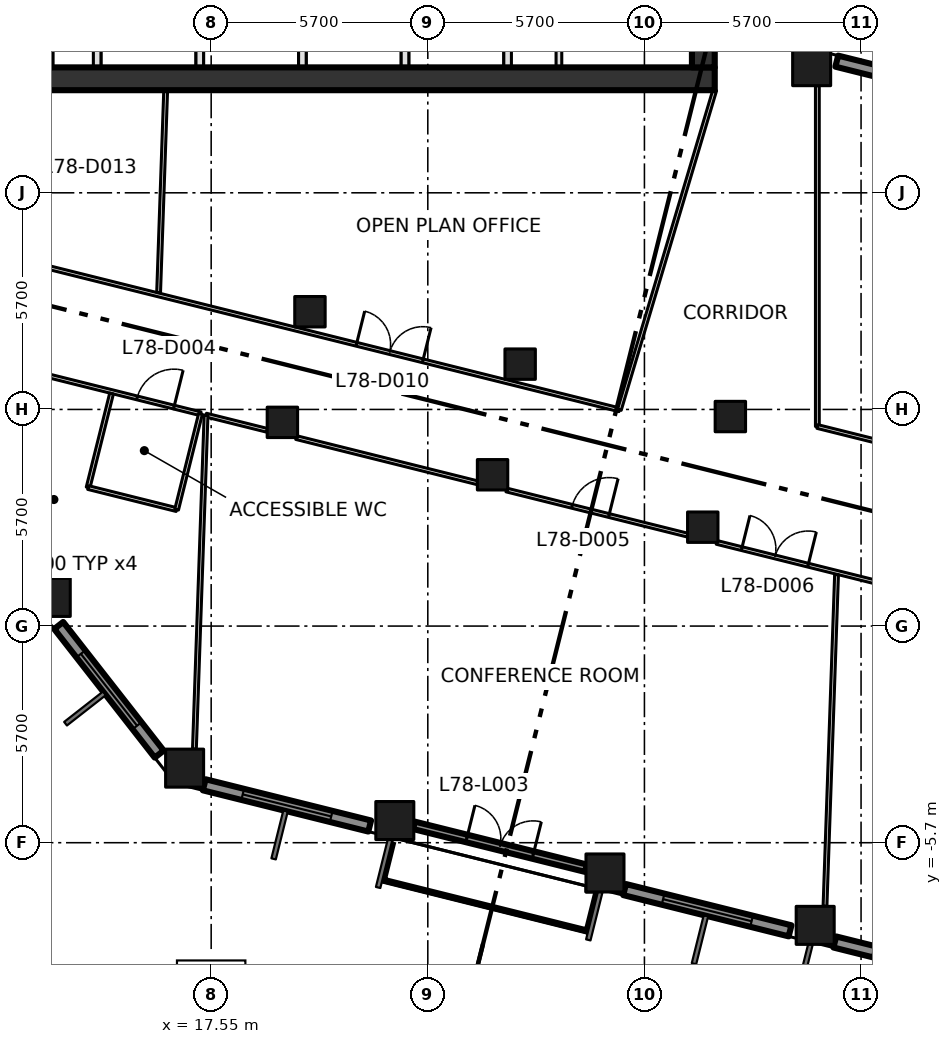
"""IFC4 building model, lengths in metres.
Left out: names, types, materials, properties, quantities, classifications, styles, units other than length and angle.
Written with IfcOpenShell. Run it as: python <this file> out.ifc"""

import sys

from ifc_helpers import new_model, si_unit, direction, frame, frame_2d, origin, origin_2d, place, context, subcontext, project, spatial, rectangle, extrude, element, fill, save


model = new_model("IFC4")
c1 = context("Model", 3, precision=1e-05, world=origin(), true_north=direction((0.0, 1.0)))
c2 = subcontext(c1, "Body", "Model", "MODEL_VIEW")
j1 = project(units=[si_unit("LENGTHUNIT", "METRE"), si_unit("PLANEANGLEUNIT", "RADIAN")], contexts=[c1])
p1 = place(None, origin())
s1 = spatial("IfcSite", under=j1, at=p1, CompositionType="ELEMENT")
p2 = place(p1, origin())
s2 = spatial("IfcBuilding", under=s1, at=p2, CompositionType="ELEMENT")
p3 = place(p2, frame((0.0, 0.0, 340.2)))
s3 = spatial("IfcBuildingStorey", under=s2, at=p3, CompositionType="ELEMENT", Elevation=340.2)
for number, where, z_axis, x_axis in (
    (1, (33.35, 14.719, 0.0), (0.0, 0.0, 1.0), (1.0, 0.0, 0.0)),
    (2, (16.851, -3.738, 0.0), (0.0, 0.0, 1.0), (1.0, 0.0, 0.0)),
    (3, (13.342, 0.754, 0.0), (0.0, 0.0, 1.0), (1.0, 0.0, 0.0)),
    (4, (22.382, -5.117, 0.0), (0.0, 0.0, 1.0), (1.0, 0.0, 0.0)),
    (5, (27.912, -6.496, 0.0), (0.0, 0.0, 1.0), (1.0, 0.0, 0.0)),
    (6, (33.443, -7.875, 0.0), (0.0, 0.0, 1.0), (1.0, 0.0, 0.0)),
):
    element("IfcColumn", number, at=place(p3, frame(where, z_axis=z_axis, x_axis=x_axis)), inside=s3, PredefinedType="COLUMN", context=c2, shape_type="SweptSolid", body=[
        extrude(rectangle(XDim=1.0, YDim=1.0, at=origin_2d()), origin(), (0.0, 0.0, 1.0), 4.2),
    ])
for number, where, z_axis, x_axis in (
    (7, (19.424, 5.36, 0.0), (0.0, 0.0, 1.0), (1.0, 0.0, 0.0)),
    (8, (24.954, 3.981, 0.0), (0.0, 0.0, 1.0), (1.0, 0.0, 0.0)),
    (9, (30.485, 2.602, 0.0), (0.0, 0.0, 1.0), (1.0, 0.0, 0.0)),
    (10, (20.149, 8.271, 0.0), (0.0, 0.0, 1.0), (1.0, 0.0, 0.0)),
    (11, (25.68, 6.892, 0.0), (0.0, 0.0, 1.0), (1.0, 0.0, 0.0)),
    (12, (31.211, 5.513, 0.0), (0.0, 0.0, 1.0), (1.0, 0.0, 0.0)),
):
    element("IfcColumn", number, at=place(p3, frame(where, z_axis=z_axis, x_axis=x_axis)), inside=s3, PredefinedType="COLUMN", context=c2, shape_type="SweptSolid", body=[
        extrude(rectangle(XDim=0.8, YDim=0.8, at=origin_2d()), origin(), (0.0, 0.0, 1.0), 4.2),
    ])
p4 = place(p3, frame((8.0, 14.4, -0.3), z_axis=(0.0, 0.0, 1.0), x_axis=(1.0, 0.0, 0.0)))
e13 = element("IfcWall", 13, at=p4, inside=s3, PredefinedType="SHEAR", context=c2, shape_type="SweptSolid", body=[
    extrude(rectangle(XDim=22.8, YDim=0.6, at=frame_2d((11.4, 0.0))), origin(), (0.0, 0.0, 1.0), 4.2),
])
p5 = place(p4, frame((2.3, 0.0, 0.3)))
e14 = element("IfcOpeningElement", 14, at=p5, cuts=e13, PredefinedType="OPENING", context=c2, shape_type="SweptSolid", body=[
    extrude(rectangle(XDim=1.8, YDim=2.1, at=frame_2d((0.9, 1.05))), frame((0.0, 0.31, 0.0), z_axis=(0.0, -1.0, 0.0), x_axis=(1.0, 0.0, 0.0)), (0.0, 0.0, 1.0), 0.62),
])
p6 = place(p3, frame((30.5, 14.7, -0.3), z_axis=(0.0, 0.0, 1.0), x_axis=(0.0, 1.0, 0.0)))
e15 = element("IfcWall", 15, at=p6, inside=s3, PredefinedType="SHEAR", context=c2, shape_type="SweptSolid", body=[
    extrude(rectangle(XDim=21.0, YDim=0.6, at=frame_2d((10.5, 0.0))), origin(), (0.0, 0.0, 1.0), 4.2),
])
for number, where, z_axis, x_axis in (
    (16, (14.55, 14.7, 0.0), (0.0, 0.0, 1.0), (0.0, 1.0, 0.0)),
    (17, (17.25, 14.7, 0.0), (0.0, 0.0, 1.0), (0.0, 1.0, 0.0)),
    (18, (19.95, 14.7, 0.0), (0.0, 0.0, 1.0), (0.0, 1.0, 0.0)),
    (19, (22.65, 14.7, 0.0), (0.0, 0.0, 1.0), (0.0, 1.0, 0.0)),
    (20, (25.35, 14.7, 0.0), (0.0, 0.0, 1.0), (0.0, 1.0, 0.0)),
):
    element("IfcWall", number, at=place(p3, frame(where, z_axis=z_axis, x_axis=x_axis)), inside=s3, PredefinedType="SOLIDWALL", context=c2, shape_type="SweptSolid", body=[
        extrude(rectangle(XDim=2.9, YDim=0.2, at=frame_2d((1.45, 0.0))), origin(), (0.0, 0.0, 1.0), 3.9),
    ])
p7 = place(p3, frame((26.7, 14.7, 0.0), z_axis=(0.0, 0.0, 1.0), x_axis=(0.0, 1.0, 0.0)))
e21 = element("IfcWall", 21, at=p7, inside=s3, PredefinedType="PARTITIONING", context=c2, shape_type="SweptSolid", body=[
    extrude(rectangle(XDim=2.9, YDim=0.15, at=frame_2d((1.45, 0.0))), origin(), (0.0, 0.0, 1.0), 3.9),
])
p8 = place(p3, frame((38.366, 13.778, 0.0), z_axis=(0.0, 0.0, 1.0), x_axis=(-0.970289506684, 0.241946839653, 0.0)))
e22 = element("IfcWall", 22, at=p8, inside=s3, PredefinedType="SOLIDWALL", context=c2, shape_type="SweptSolid", body=[
    extrude(rectangle(XDim=4.488, YDim=0.3, at=frame_2d((2.244, 0.0))), origin(), (0.0, 0.0, 1.0), 3.2),
])
p9 = place(p8, frame((1.044, 0.0, 0.8)))
e23 = element("IfcOpeningElement", 23, at=p9, cuts=e22, PredefinedType="OPENING", context=c2, shape_type="SweptSolid", body=[
    extrude(rectangle(XDim=2.4, YDim=2.1, at=frame_2d((1.2, 1.05))), frame((0.0, 0.16, 0.0), z_axis=(0.0, -1.0, 0.0), x_axis=(1.0, 0.0, 0.0)), (0.0, 0.0, 1.0), 0.32),
])
p10 = place(p3, frame((13.538, 0.016, 0.0), z_axis=(0.0, 0.0, 1.0), x_axis=(0.615713519567, -0.787970089421, 0.0)))
e24 = element("IfcWall", 24, at=p10, inside=s3, PredefinedType="SOLIDWALL", context=c2, shape_type="SweptSolid", body=[
    extrude(rectangle(XDim=4.296, YDim=0.3, at=frame_2d((2.148, 0.0))), origin(), (0.0, 0.0, 1.0), 3.2),
])
p11 = place(p10, frame((0.948, 0.0, 0.8)))
e25 = element("IfcOpeningElement", 25, at=p11, cuts=e24, PredefinedType="OPENING", context=c2, shape_type="SweptSolid", body=[
    extrude(rectangle(XDim=2.4, YDim=2.1, at=frame_2d((1.2, 1.05))), frame((0.0, 0.16, 0.0), z_axis=(0.0, -1.0, 0.0), x_axis=(1.0, 0.0, 0.0)), (0.0, 0.0, 1.0), 0.32),
])
p12 = place(p3, frame((17.367, -4.176, 0.0), z_axis=(0.0, 0.0, 1.0), x_axis=(0.970327846266, -0.241793032904, 0.0)))
e26 = element("IfcWall", 26, at=p12, inside=s3, PredefinedType="SOLIDWALL", context=c2, shape_type="SweptSolid", body=[
    extrude(rectangle(XDim=4.487, YDim=0.3, at=frame_2d((2.244, 0.0))), origin(), (0.0, 0.0, 1.0), 3.2),
])
p13 = place(p12, frame((1.044, 0.0, 0.8)))
e27 = element("IfcOpeningElement", 27, at=p13, cuts=e26, PredefinedType="OPENING", context=c2, shape_type="SweptSolid", body=[
    extrude(rectangle(XDim=2.4, YDim=2.1, at=frame_2d((1.2, 1.05))), frame((0.0, 0.16, 0.0), z_axis=(0.0, -1.0, 0.0), x_axis=(1.0, 0.0, 0.0)), (0.0, 0.0, 1.0), 0.32),
])
p14 = place(p3, frame((22.882, -5.242, 0.0), z_axis=(0.0, 0.0, 1.0), x_axis=(0.970311449929, -0.241858822739, 0.0)))
e28 = element("IfcWall", 28, at=p14, inside=s3, PredefinedType="SOLIDWALL", context=c2, shape_type="SweptSolid", body=[
    extrude(rectangle(XDim=4.669, YDim=0.2, at=frame_2d((2.334, 0.0))), origin(), (0.0, 0.0, 1.0), 3.2),
])
p15 = place(p14, frame((1.434, 0.0, 0.0)))
e29 = element("IfcOpeningElement", 29, at=p15, cuts=e28, PredefinedType="OPENING", context=c2, shape_type="SweptSolid", body=[
    extrude(rectangle(XDim=1.8, YDim=2.9, at=frame_2d((0.9, 1.45))), frame((0.0, 0.11, 0.0), z_axis=(0.0, -1.0, 0.0), x_axis=(1.0, 0.0, 0.0)), (0.0, 0.0, 1.0), 0.22),
])
p16 = place(p3, frame((22.225, -6.448, 0.0), z_axis=(0.0, 0.0, 1.0), x_axis=(0.970268314528, -0.242031811592, 0.0)))
e30 = element("IfcWall", 30, at=p16, inside=s3, PredefinedType="SOLIDWALL", context=c2, shape_type="SweptSolid", body=[
    extrude(rectangle(XDim=5.359, YDim=0.4, at=frame_2d((2.68, 0.0))), origin(), (0.0, 0.0, 1.0), 0.3),
])
p17 = place(p3, frame((28.428, -6.933, 0.0), z_axis=(0.0, 0.0, 1.0), x_axis=(0.970276766004, -0.241997928406, 0.0)))
e31 = element("IfcWall", 31, at=p17, inside=s3, PredefinedType="SOLIDWALL", context=c2, shape_type="SweptSolid", body=[
    extrude(rectangle(XDim=4.487, YDim=0.3, at=frame_2d((2.244, 0.0))), origin(), (0.0, 0.0, 1.0), 3.2),
])
p18 = place(p17, frame((1.044, 0.0, 0.8)))
e32 = element("IfcOpeningElement", 32, at=p18, cuts=e31, PredefinedType="OPENING", context=c2, shape_type="SweptSolid", body=[
    extrude(rectangle(XDim=2.4, YDim=2.1, at=frame_2d((1.2, 1.05))), frame((0.0, 0.16, 0.0), z_axis=(0.0, -1.0, 0.0), x_axis=(1.0, 0.0, 0.0)), (0.0, 0.0, 1.0), 0.32),
])
p19 = place(p3, frame((33.959, -8.312, 0.0), z_axis=(0.0, 0.0, 1.0), x_axis=(0.970276766004, -0.241997928406, 0.0)))
e33 = element("IfcWall", 33, at=p19, inside=s3, PredefinedType="SOLIDWALL", context=c2, shape_type="SweptSolid", body=[
    extrude(rectangle(XDim=4.487, YDim=0.3, at=frame_2d((2.244, 0.0))), origin(), (0.0, 0.0, 1.0), 3.2),
])
p20 = place(p19, frame((1.044, 0.0, 0.8)))
e34 = element("IfcOpeningElement", 34, at=p20, cuts=e33, PredefinedType="OPENING", context=c2, shape_type="SweptSolid", body=[
    extrude(rectangle(XDim=2.4, YDim=2.1, at=frame_2d((1.2, 1.05))), frame((0.0, 0.16, 0.0), z_axis=(0.0, -1.0, 0.0), x_axis=(1.0, 0.0, 0.0)), (0.0, 0.0, 1.0), 0.32),
])
p21 = place(p3, frame((8.333, 7.815, 0.0), z_axis=(0.0, 0.0, 1.0), x_axis=(0.970301331289, -0.241899414012, 0.0)))
e35 = element("IfcWall", 35, at=p21, inside=s3, PredefinedType="PARTITIONING", context=c2, shape_type="SweptSolid", body=[
    extrude(rectangle(XDim=9.21, YDim=0.1, at=frame_2d((4.605, 0.0))), origin(), (0.0, 0.0, 1.0), 3.9),
])
p22 = place(p21, frame((7.49, 0.0, 0.0)))
e36 = element("IfcOpeningElement", 36, at=p22, cuts=e35, PredefinedType="OPENING", context=c2, shape_type="SweptSolid", body=[
    extrude(rectangle(XDim=1.0, YDim=2.1, at=frame_2d((0.5, 1.05))), frame((0.0, 0.06, 0.0), z_axis=(0.0, -1.0, 0.0), x_axis=(1.0, 0.0, 0.0)), (0.0, 0.0, 1.0), 0.12),
])
p23 = place(p3, frame((9.002, 10.499, 0.0), z_axis=(0.0, 0.0, 1.0), x_axis=(0.970298340477, -0.241911410372, 0.0)))
e37 = element("IfcWall", 37, at=p23, inside=s3, PredefinedType="PARTITIONING", context=c2, shape_type="SweptSolid", body=[
    extrude(rectangle(XDim=19.88, YDim=0.1, at=frame_2d((9.94, 0.0))), origin(), (0.0, 0.0, 1.0), 3.9),
])
p24 = place(p23, frame((12.749, 0.0, 0.0)))
e38 = element("IfcOpeningElement", 38, at=p24, cuts=e37, PredefinedType="OPENING", context=c2, shape_type="SweptSolid", body=[
    extrude(rectangle(XDim=1.8, YDim=2.1, at=frame_2d((0.9, 1.05))), frame((0.0, 0.06, 0.0), z_axis=(0.0, -1.0, 0.0), x_axis=(1.0, 0.0, 0.0)), (0.0, 0.0, 1.0), 0.12),
])
p25 = place(p3, frame((17.415, 5.551, 0.0), z_axis=(0.0, 0.0, 1.0), x_axis=(0.970298198748, -0.241911978838, 0.0)))
e39 = element("IfcWall", 39, at=p25, inside=s3, PredefinedType="PARTITIONING", context=c2, shape_type="SweptSolid", body=[
    extrude(rectangle(XDim=1.658, YDim=0.1, at=frame_2d((0.829, 0.0))), origin(), (0.0, 0.0, 1.0), 3.9),
])
p26 = place(p3, frame((19.786, 4.96, 0.0), z_axis=(0.0, 0.0, 1.0), x_axis=(0.970288447449, -0.24195108751, 0.0)))
e40 = element("IfcWall", 40, at=p26, inside=s3, PredefinedType="PARTITIONING", context=c2, shape_type="SweptSolid", body=[
    extrude(rectangle(XDim=4.914, YDim=0.1, at=frame_2d((2.457, 0.0))), origin(), (0.0, 0.0, 1.0), 3.9),
])
p27 = place(p3, frame((25.318, 3.581, 0.0), z_axis=(0.0, 0.0, 1.0), x_axis=(0.970320559999, -0.241822271189, 0.0)))
e41 = element("IfcWall", 41, at=p27, inside=s3, PredefinedType="PARTITIONING", context=c2, shape_type="SweptSolid", body=[
    extrude(rectangle(XDim=4.913, YDim=0.1, at=frame_2d((2.456, 0.0))), origin(), (0.0, 0.0, 1.0), 3.9),
])
p28 = place(p27, frame((1.78, 0.0, 0.0)))
e42 = element("IfcOpeningElement", 42, at=p28, cuts=e41, PredefinedType="OPENING", context=c2, shape_type="SweptSolid", body=[
    extrude(rectangle(XDim=1.0, YDim=2.1, at=frame_2d((0.5, 1.05))), frame((0.0, 0.06, 0.0), z_axis=(0.0, -1.0, 0.0), x_axis=(1.0, 0.0, 0.0)), (0.0, 0.0, 1.0), 0.12),
])
p29 = place(p3, frame((30.8, 14.1, 0.0), z_axis=(0.0, 0.0, 1.0), x_axis=(-0.28588265334, -0.958264633867, 0.0)))
e43 = element("IfcWall", 43, at=p29, inside=s3, PredefinedType="PARTITIONING", context=c2, shape_type="SweptSolid", body=[
    extrude(rectangle(XDim=8.776, YDim=0.1, at=frame_2d((4.388, 0.0))), origin(), (0.0, 0.0, 1.0), 3.9),
])
p30 = place(p3, frame((30.85, 2.202, 0.0), z_axis=(0.0, 0.0, 1.0), x_axis=(0.970308932068, -0.2418689239, 0.0)))
e44 = element("IfcWall", 44, at=p30, inside=s3, PredefinedType="PARTITIONING", context=c2, shape_type="SweptSolid", body=[
    extrude(rectangle(XDim=4.912, YDim=0.1, at=frame_2d((2.456, 0.0))), origin(), (0.0, 0.0, 1.0), 3.9),
])
p31 = place(p30, frame((0.68, 0.0, 0.0)))
e45 = element("IfcOpeningElement", 45, at=p31, cuts=e44, PredefinedType="OPENING", context=c2, shape_type="SweptSolid", body=[
    extrude(rectangle(XDim=1.8, YDim=2.1, at=frame_2d((0.9, 1.05))), frame((0.0, 0.06, 0.0), z_axis=(0.0, -1.0, 0.0), x_axis=(1.0, 0.0, 0.0)), (0.0, 0.0, 1.0), 0.12),
])
p32 = place(p3, frame((33.5, 5.251, 0.0), z_axis=(0.0, 0.0, 1.0), x_axis=(0.0, 1.0, 0.0)))
e46 = element("IfcWall", 46, at=p32, inside=s3, PredefinedType="PARTITIONING", context=c2, shape_type="SweptSolid", body=[
    extrude(rectangle(XDim=8.968, YDim=0.1, at=frame_2d((4.484, 0.0))), origin(), (0.0, 0.0, 1.0), 3.9),
])
p33 = place(p3, frame((36.376, 4.534, 0.0), z_axis=(0.0, 0.0, 1.0), x_axis=(-0.970297347928, 0.241915391415, 0.0)))
e47 = element("IfcWall", 47, at=p33, inside=s3, PredefinedType="PARTITIONING", context=c2, shape_type="SweptSolid", body=[
    extrude(rectangle(XDim=2.964, YDim=0.1, at=frame_2d((1.482, 0.0))), origin(), (0.0, 0.0, 1.0), 3.9),
])
p34 = place(p3, frame((14.312, 3.645, 0.0), z_axis=(0.0, 0.0, 1.0), x_axis=(0.241972320765, 0.970283152478, 0.0)))
e48 = element("IfcWall", 48, at=p34, inside=s3, PredefinedType="PARTITIONING", context=c2, shape_type="SweptSolid", body=[
    extrude(rectangle(XDim=2.55, YDim=0.1, at=frame_2d((1.275, 0.0))), origin(), (0.0, 0.0, 1.0), 3.9),
])
p35 = place(p3, frame((16.167, 8.775, 0.0), z_axis=(0.0, 0.0, 1.0), x_axis=(0.034913599617, 0.999390334435, 0.0)))
e49 = element("IfcWall", 49, at=p35, inside=s3, PredefinedType="PARTITIONING", context=c2, shape_type="SweptSolid", body=[
    extrude(rectangle(XDim=5.328, YDim=0.1, at=frame_2d((2.664, 0.0))), origin(), (0.0, 0.0, 1.0), 3.9),
])
p36 = place(p3, frame((16.641, 3.064, 0.0), z_axis=(0.0, 0.0, 1.0), x_axis=(-0.970262034576, 0.242056985565, 0.0)))
e50 = element("IfcWall", 50, at=p36, inside=s3, PredefinedType="PARTITIONING", context=c2, shape_type="SweptSolid", body=[
    extrude(rectangle(XDim=2.4, YDim=0.1, at=frame_2d((1.2, 0.0))), origin(), (0.0, 0.0, 1.0), 3.9),
])
p37 = place(p3, frame((17.109, -3.238, 0.0), z_axis=(0.0, 0.0, 1.0), x_axis=(0.034812219839, 0.999393870979, 0.0)))
e51 = element("IfcWall", 51, at=p37, inside=s3, PredefinedType="PARTITIONING", context=c2, shape_type="SweptSolid", body=[
    extrude(rectangle(XDim=8.794, YDim=0.1, at=frame_2d((4.397, 0.0))), origin(), (0.0, 0.0, 1.0), 3.9),
])
p38 = place(p3, frame((17.27, 5.587, 0.0), z_axis=(0.0, 0.0, 1.0), x_axis=(-0.241872782222, -0.970307970296, 0.0)))
e52 = element("IfcWall", 52, at=p38, inside=s3, PredefinedType="PARTITIONING", context=c2, shape_type="SweptSolid", body=[
    extrude(rectangle(XDim=2.6, YDim=0.1, at=frame_2d((1.3, 0.0))), origin(), (0.0, 0.0, 1.0), 3.9),
])
p39 = place(p3, frame((33.701, -7.375, 0.0), z_axis=(0.0, 0.0, 1.0), x_axis=(0.034804076154, 0.999394154617, 0.0)))
e53 = element("IfcWall", 53, at=p39, inside=s3, PredefinedType="PARTITIONING", context=c2, shape_type="SweptSolid", body=[
    extrude(rectangle(XDim=8.733, YDim=0.1, at=frame_2d((4.367, 0.0))), origin(), (0.0, 0.0, 1.0), 3.9),
])
p40 = place(p11, origin())
e54 = element("IfcWindow", 54, at=p40, inside=s3, PartitioningType="DOUBLE_PANEL_VERTICAL", PredefinedType="WINDOW", context=c2, shape_type="SweptSolid", body=[
    extrude(rectangle(XDim=2.4, YDim=2.1, at=frame_2d((1.2, 1.05))), frame((0.0, 0.03, 0.0), z_axis=(0.0, -1.0, 0.0), x_axis=(1.0, 0.0, 0.0)), (0.0, 0.0, 1.0), 0.06),
])
fill(e25, e54)
p41 = place(p13, origin())
e55 = element("IfcWindow", 55, at=p41, inside=s3, PartitioningType="DOUBLE_PANEL_VERTICAL", PredefinedType="WINDOW", context=c2, shape_type="SweptSolid", body=[
    extrude(rectangle(XDim=2.4, YDim=2.1, at=frame_2d((1.2, 1.05))), frame((0.0, 0.03, 0.0), z_axis=(0.0, -1.0, 0.0), x_axis=(1.0, 0.0, 0.0)), (0.0, 0.0, 1.0), 0.06),
])
fill(e27, e55)
p42 = place(p15, origin())
e56 = element("IfcDoor", 56, at=p42, inside=s3, OperationType="DOUBLE_DOOR_SINGLE_SWING", PredefinedType="DOOR", context=c2, shape_type="SweptSolid", body=[
    extrude(rectangle(XDim=1.8, YDim=2.9, at=frame_2d((0.9, 1.45))), frame((0.0, 0.025, 0.0), z_axis=(0.0, -1.0, 0.0), x_axis=(1.0, 0.0, 0.0)), (0.0, 0.0, 1.0), 0.05),
])
fill(e29, e56)
p43 = place(p18, origin())
e57 = element("IfcWindow", 57, at=p43, inside=s3, PartitioningType="DOUBLE_PANEL_VERTICAL", PredefinedType="WINDOW", context=c2, shape_type="SweptSolid", body=[
    extrude(rectangle(XDim=2.4, YDim=2.1, at=frame_2d((1.2, 1.05))), frame((0.0, 0.03, 0.0), z_axis=(0.0, -1.0, 0.0), x_axis=(1.0, 0.0, 0.0)), (0.0, 0.0, 1.0), 0.06),
])
fill(e32, e57)
p44 = place(p22, origin())
e58 = element("IfcDoor", 58, at=p44, inside=s3, OperationType="SINGLE_SWING_RIGHT", PredefinedType="DOOR", context=c2, shape_type="SweptSolid", body=[
    extrude(rectangle(XDim=1.0, YDim=2.1, at=frame_2d((0.5, 1.05))), frame((0.0, 0.025, 0.0), z_axis=(0.0, -1.0, 0.0), x_axis=(1.0, 0.0, 0.0)), (0.0, 0.0, 1.0), 0.05),
])
fill(e36, e58)
p45 = place(p28, origin())
e59 = element("IfcDoor", 59, at=p45, inside=s3, OperationType="SINGLE_SWING_RIGHT", PredefinedType="DOOR", context=c2, shape_type="SweptSolid", body=[
    extrude(rectangle(XDim=1.0, YDim=2.1, at=frame_2d((0.5, 1.05))), frame((0.0, 0.025, 0.0), z_axis=(0.0, -1.0, 0.0), x_axis=(1.0, 0.0, 0.0)), (0.0, 0.0, 1.0), 0.05),
])
fill(e42, e59)
p46 = place(p31, origin())
e60 = element("IfcDoor", 60, at=p46, inside=s3, OperationType="DOUBLE_DOOR_SINGLE_SWING", PredefinedType="DOOR", context=c2, shape_type="SweptSolid", body=[
    extrude(rectangle(XDim=1.8, YDim=2.1, at=frame_2d((0.9, 1.05))), frame((0.0, 0.025, 0.0), z_axis=(0.0, -1.0, 0.0), x_axis=(1.0, 0.0, 0.0)), (0.0, 0.0, 1.0), 0.05),
])
fill(e45, e60)
p47 = place(p24, origin())
e61 = element("IfcDoor", 61, at=p47, inside=s3, OperationType="DOUBLE_DOOR_SINGLE_SWING", PredefinedType="DOOR", context=c2, shape_type="SweptSolid", body=[
    extrude(rectangle(XDim=1.8, YDim=2.1, at=frame_2d((0.9, 1.05))), frame((0.0, 0.025, 0.0), z_axis=(0.0, -1.0, 0.0), x_axis=(1.0, 0.0, 0.0)), (0.0, 0.0, 1.0), 0.05),
])
fill(e38, e61)
save(model, sys.argv[1])
